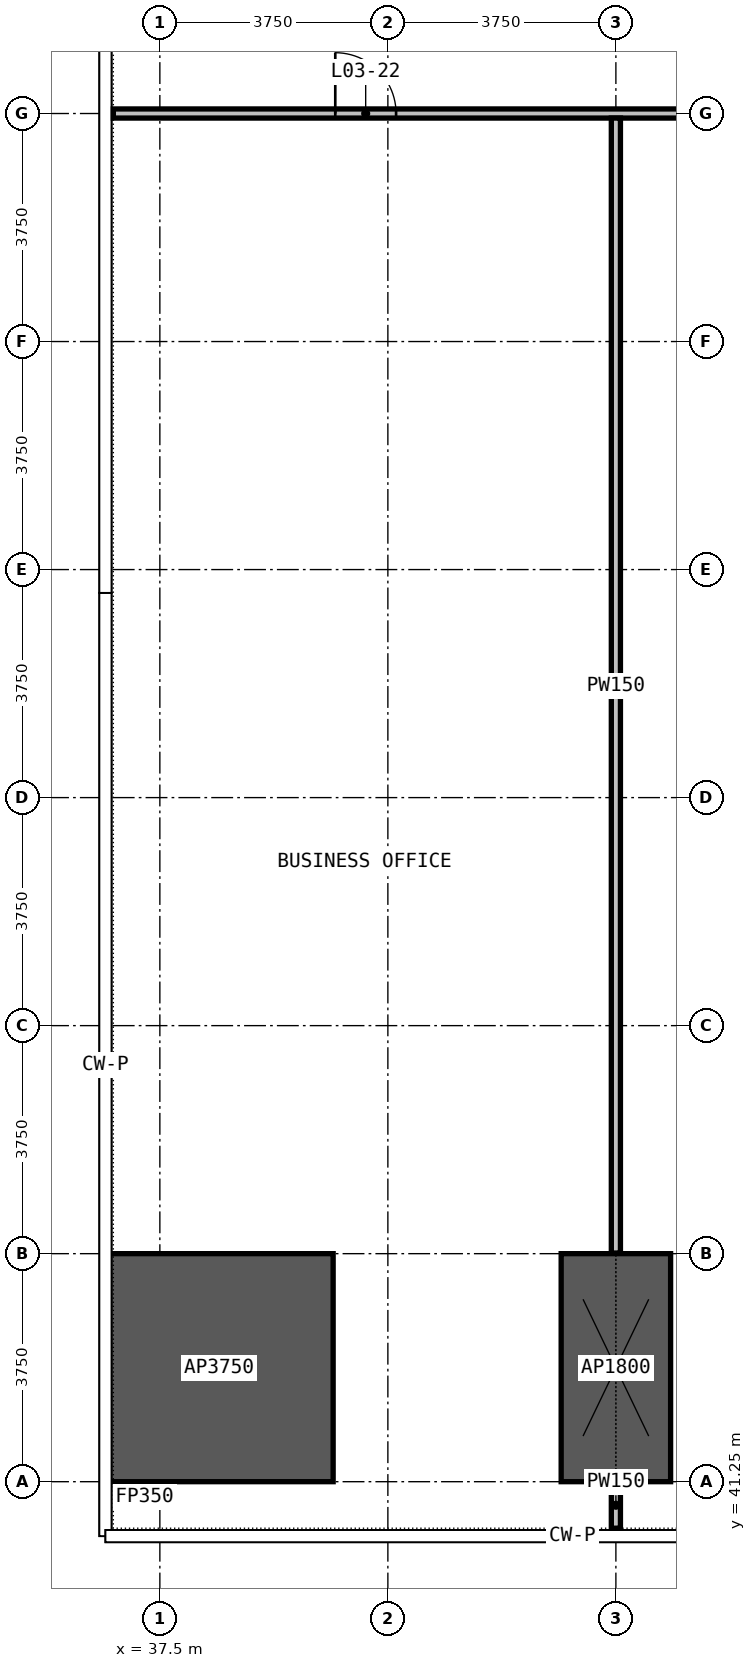
"""IFC4 building model, lengths in metres.
Left out: names, types, materials, properties, quantities, classifications, styles, units other than length and angle.
Written with IfcOpenShell. Run it as: python <this file> out.ifc"""

import sys

from ifc_helpers import new_model, si_unit, direction, frame, frame_2d, origin, place, context, subcontext, project, spatial, rectangle, extrude, element, fill, save


model = new_model("IFC4")
c1 = context("Model", 3, precision=1e-05, world=origin(), true_north=direction((0.0, 1.0)))
c2 = subcontext(c1, "Body", "Model", "MODEL_VIEW")
j1 = project(units=[si_unit("LENGTHUNIT", "METRE"), si_unit("PLANEANGLEUNIT", "RADIAN")], contexts=[c1])
p1 = place(None, origin())
s1 = spatial("IfcSite", under=j1, at=p1, CompositionType="ELEMENT")
p2 = place(p1, origin())
s2 = spatial("IfcBuilding", under=s1, at=p2, CompositionType="ELEMENT")
p3 = place(p2, frame((0.0, 0.0, 24.0)))
s3 = spatial("IfcBuildingStorey", under=s2, at=p3, CompositionType="ELEMENT", Elevation=24.0)
p4 = place(p3, frame((38.475, 41.25, 0.0), z_axis=(0.0, 0.0, 1.0), x_axis=(0.0, 1.0, 0.0)))
e1 = element("IfcWall", 1, at=p4, inside=s3, PredefinedType="SHEAR", context=c2, shape_type="SweptSolid", body=[
    extrude(rectangle(XDim=3.75, YDim=3.75, at=frame_2d((1.875, 0.0))), origin(), (0.0, 0.0, 1.0), 6.0),
])
p5 = place(p3, frame((45.0, 41.25, 0.0), z_axis=(0.0, 0.0, 1.0), x_axis=(0.0, 1.0, 0.0)))
e2 = element("IfcWall", 2, at=p5, inside=s3, PredefinedType="SHEAR", context=c2, shape_type="SweptSolid", body=[
    extrude(rectangle(XDim=3.75, YDim=1.8, at=frame_2d((1.875, 0.0))), origin(), (0.0, 0.0, 1.0), 6.0),
])
p6 = place(p3, frame((36.735, 63.75, 0.0), z_axis=(0.0, 0.0, 1.0), x_axis=(1.0, 0.0, 0.0)))
e3 = element("IfcWall", 3, at=p6, inside=s3, PredefinedType="PARTITIONING", context=c2, shape_type="SweptSolid", body=[
    extrude(rectangle(XDim=76.53, YDim=0.15, at=frame_2d((38.265, 0.0))), origin(), (0.0, 0.0, 1.0), 5.65),
])
p7 = place(p6, frame((33.615, 0.0, 0.0)))
e4 = element("IfcOpeningElement", 4, at=p7, cuts=e3, PredefinedType="OPENING", context=c2, shape_type="SweptSolid", body=[
    extrude(rectangle(XDim=1.8, YDim=2.2, at=frame_2d((0.9, 1.1))), frame((0.0, 0.085, 0.0), z_axis=(0.0, -1.0, 0.0), x_axis=(1.0, 0.0, 0.0)), (0.0, 0.0, 1.0), 0.17),
])
p8 = place(p6, frame((41.115, 0.0, 0.0)))
e5 = element("IfcOpeningElement", 5, at=p8, cuts=e3, PredefinedType="OPENING", context=c2, shape_type="SweptSolid", body=[
    extrude(rectangle(XDim=1.8, YDim=2.2, at=frame_2d((0.9, 1.1))), frame((0.0, 0.085, 0.0), z_axis=(0.0, -1.0, 0.0), x_axis=(1.0, 0.0, 0.0)), (0.0, 0.0, 1.0), 0.17),
])
p9 = place(p6, frame((26.565, 0.0, 0.0)))
e6 = element("IfcOpeningElement", 6, at=p9, cuts=e3, PredefinedType="OPENING", context=c2, shape_type="SweptSolid", body=[
    extrude(rectangle(XDim=0.9, YDim=2.2, at=frame_2d((0.45, 1.1))), frame((0.0, 0.085, 0.0), z_axis=(0.0, -1.0, 0.0), x_axis=(1.0, 0.0, 0.0)), (0.0, 0.0, 1.0), 0.17),
])
p10 = place(p6, frame((49.065, 0.0, 0.0)))
e7 = element("IfcOpeningElement", 7, at=p10, cuts=e3, PredefinedType="OPENING", context=c2, shape_type="SweptSolid", body=[
    extrude(rectangle(XDim=0.9, YDim=2.2, at=frame_2d((0.45, 1.1))), frame((0.0, 0.085, 0.0), z_axis=(0.0, -1.0, 0.0), x_axis=(1.0, 0.0, 0.0)), (0.0, 0.0, 1.0), 0.17),
])
p11 = place(p6, frame((3.65, 0.0, 0.0)))
e8 = element("IfcOpeningElement", 8, at=p11, cuts=e3, PredefinedType="OPENING", context=c2, shape_type="SweptSolid", body=[
    extrude(rectangle(XDim=1.0, YDim=2.2, at=frame_2d((0.5, 1.1))), frame((0.0, 0.085, 0.0), z_axis=(0.0, -1.0, 0.0), x_axis=(1.0, 0.0, 0.0)), (0.0, 0.0, 1.0), 0.17),
])
p12 = place(p6, frame((11.515, 0.0, 0.0)))
e9 = element("IfcOpeningElement", 9, at=p12, cuts=e3, PredefinedType="OPENING", context=c2, shape_type="SweptSolid", body=[
    extrude(rectangle(XDim=1.0, YDim=2.2, at=frame_2d((0.5, 1.1))), frame((0.0, 0.085, 0.0), z_axis=(0.0, -1.0, 0.0), x_axis=(1.0, 0.0, 0.0)), (0.0, 0.0, 1.0), 0.17),
])
p13 = place(p6, frame((19.015, 0.0, 0.0)))
e10 = element("IfcOpeningElement", 10, at=p13, cuts=e3, PredefinedType="OPENING", context=c2, shape_type="SweptSolid", body=[
    extrude(rectangle(XDim=1.0, YDim=2.2, at=frame_2d((0.5, 1.1))), frame((0.0, 0.085, 0.0), z_axis=(0.0, -1.0, 0.0), x_axis=(1.0, 0.0, 0.0)), (0.0, 0.0, 1.0), 0.17),
])
p14 = place(p6, frame((56.515, 0.0, 0.0)))
e11 = element("IfcOpeningElement", 11, at=p14, cuts=e3, PredefinedType="OPENING", context=c2, shape_type="SweptSolid", body=[
    extrude(rectangle(XDim=1.0, YDim=2.2, at=frame_2d((0.5, 1.1))), frame((0.0, 0.085, 0.0), z_axis=(0.0, -1.0, 0.0), x_axis=(1.0, 0.0, 0.0)), (0.0, 0.0, 1.0), 0.17),
])
p15 = place(p6, frame((64.015, 0.0, 0.0)))
e12 = element("IfcOpeningElement", 12, at=p15, cuts=e3, PredefinedType="OPENING", context=c2, shape_type="SweptSolid", body=[
    extrude(rectangle(XDim=1.0, YDim=2.2, at=frame_2d((0.5, 1.1))), frame((0.0, 0.085, 0.0), z_axis=(0.0, -1.0, 0.0), x_axis=(1.0, 0.0, 0.0)), (0.0, 0.0, 1.0), 0.17),
])
p16 = place(p6, frame((71.915, 0.0, 0.0)))
e13 = element("IfcOpeningElement", 13, at=p16, cuts=e3, PredefinedType="OPENING", context=c2, shape_type="SweptSolid", body=[
    extrude(rectangle(XDim=1.0, YDim=2.2, at=frame_2d((0.5, 1.1))), frame((0.0, 0.085, 0.0), z_axis=(0.0, -1.0, 0.0), x_axis=(1.0, 0.0, 0.0)), (0.0, 0.0, 1.0), 0.17),
])
p17 = place(p3, frame((45.0, 40.485, 0.0), z_axis=(0.0, 0.0, 1.0), x_axis=(0.0, 1.0, 0.0)))
e14 = element("IfcWall", 14, at=p17, inside=s3, PredefinedType="PARTITIONING", context=c2, shape_type="SweptSolid", body=[
    extrude(rectangle(XDim=0.755, YDim=0.15, at=frame_2d((0.377, 0.0))), origin(), (0.0, 0.0, 1.0), 5.65),
])
p18 = place(p3, frame((45.0, 45.01, 0.0), z_axis=(0.0, 0.0, 1.0), x_axis=(0.0, 1.0, 0.0)))
e15 = element("IfcWall", 15, at=p18, inside=s3, PredefinedType="PARTITIONING", context=c2, shape_type="SweptSolid", body=[
    extrude(rectangle(XDim=18.665, YDim=0.15, at=frame_2d((9.333, 0.0))), origin(), (0.0, 0.0, 1.0), 5.65),
])
p19 = place(p11, origin())
e16 = element("IfcDoor", 16, at=p19, inside=s3, OperationType="SINGLE_SWING_RIGHT", PredefinedType="DOOR", context=c2, shape_type="SweptSolid", body=[
    extrude(rectangle(XDim=1.0, YDim=2.2, at=frame_2d((0.5, 1.1))), frame((0.0, 0.025, 0.0), z_axis=(0.0, -1.0, 0.0), x_axis=(1.0, 0.0, 0.0)), (0.0, 0.0, 1.0), 0.05),
])
fill(e8, e16)
save(model, sys.argv[1])
